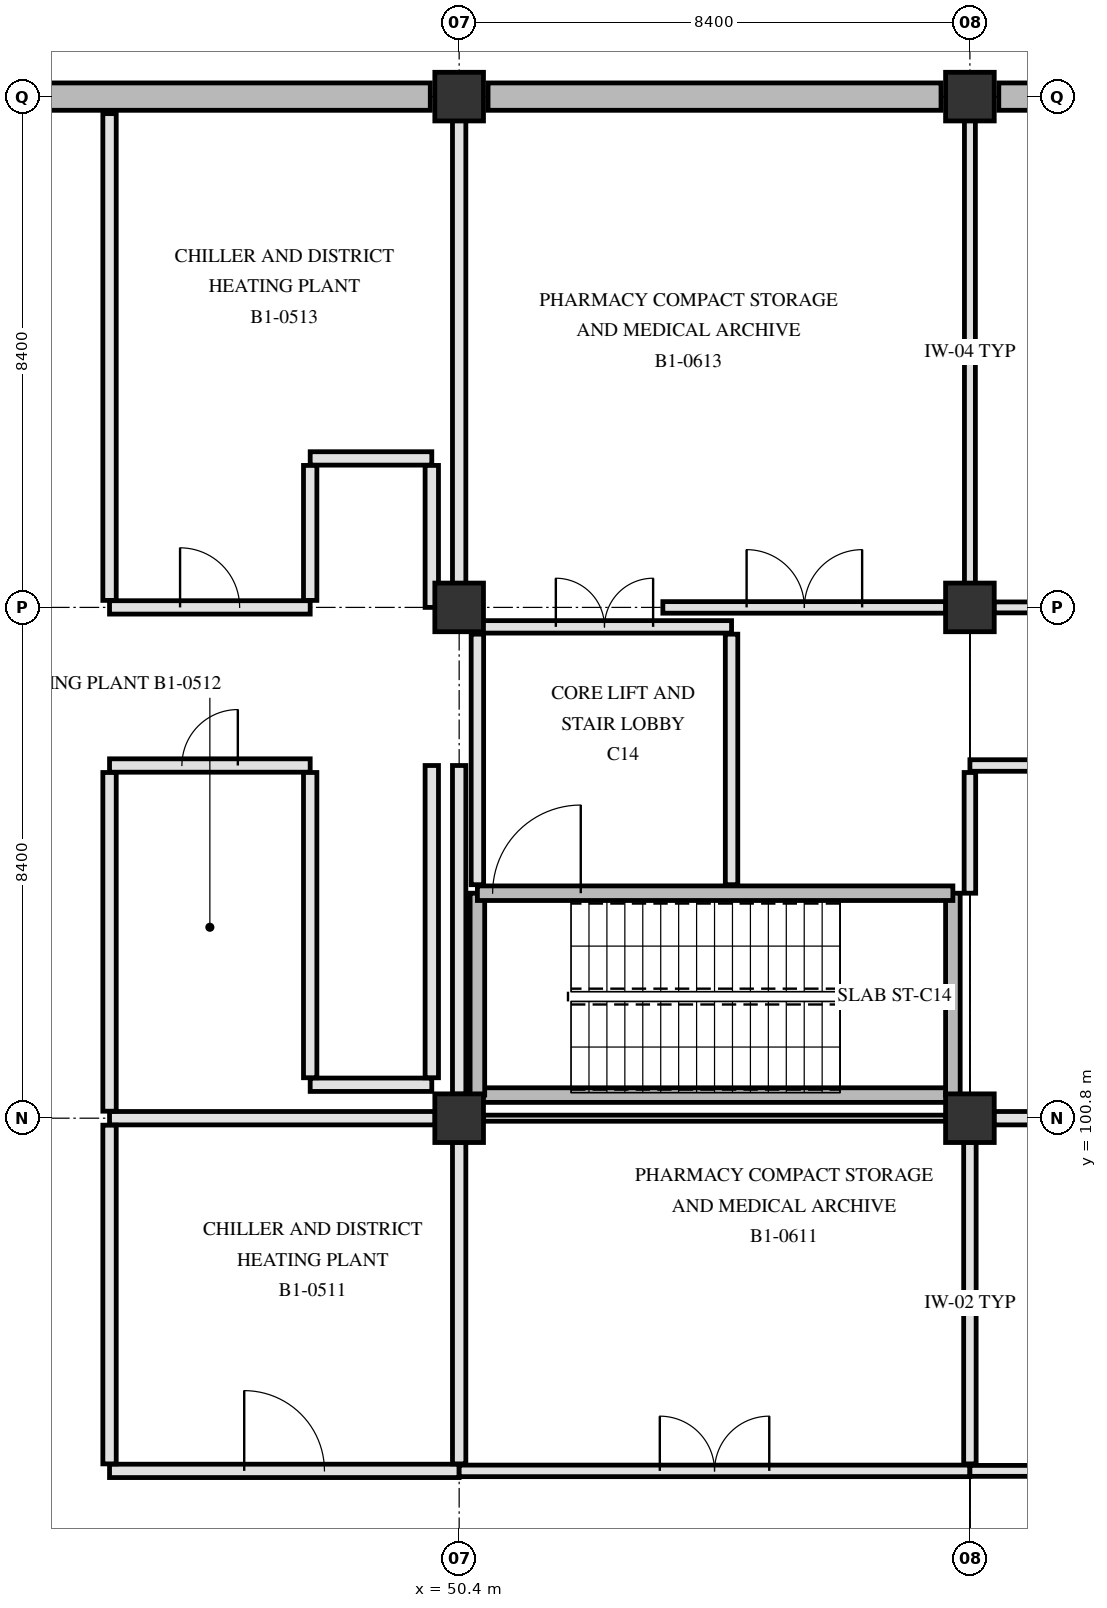
"""IFC4 building model, lengths in metres.
Left out: names, types, materials, properties, quantities, classifications, styles, units other than length and angle.
Written with IfcOpenShell. Run it as: python <this file> out.ifc"""

import sys

from ifc_helpers import new_model, si_unit, direction, frame, frame_2d, origin, origin_2d, place, context, subcontext, project, spatial, rectangle, extrude, element, fill, save


model = new_model("IFC4")
c1 = context("Model", 3, precision=1e-05, world=origin(), true_north=direction((0.0, 1.0)))
c2 = subcontext(c1, "Body", "Model", "MODEL_VIEW")
j1 = project(units=[si_unit("LENGTHUNIT", "METRE"), si_unit("PLANEANGLEUNIT", "RADIAN")], contexts=[c1])
p1 = place(None, origin())
s1 = spatial("IfcSite", under=j1, at=p1, CompositionType="ELEMENT")
p2 = place(p1, origin())
s2 = spatial("IfcBuilding", under=s1, at=p2, CompositionType="ELEMENT")
p3 = place(p2, frame((0.0, 0.0, -5.4)))
s3 = spatial("IfcBuildingStorey", under=s2, at=p3, CompositionType="ELEMENT", Elevation=-5.4)
for number, where, z_axis, x_axis in (
    (1, (50.4, 100.8, 0.0), (0.0, 0.0, 1.0), (1.0, 0.0, 0.0)),
    (2, (50.4, 109.2, 0.0), (0.0, 0.0, 1.0), (1.0, 0.0, 0.0)),
    (3, (50.4, 117.6, 0.0), (0.0, 0.0, 1.0), (1.0, 0.0, 0.0)),
    (4, (58.8, 100.8, 0.0), (0.0, 0.0, 1.0), (1.0, 0.0, 0.0)),
    (5, (58.8, 109.2, 0.0), (0.0, 0.0, 1.0), (1.0, 0.0, 0.0)),
    (6, (58.8, 117.6, 0.0), (0.0, 0.0, 1.0), (1.0, 0.0, 0.0)),
):
    element("IfcColumn", number, at=place(p3, frame(where, z_axis=z_axis, x_axis=x_axis)), inside=s3, PredefinedType="COLUMN", context=c2, shape_type="SweptSolid", body=[
        extrude(rectangle(XDim=0.8, YDim=0.8, at=origin_2d()), origin(), (0.0, 0.0, 1.0), 5.4),
    ])
for number, where, z_axis, x_axis in (
    (7, (42.475, 117.6, 0.0), (0.0, 0.0, 1.0), (1.0, 0.0, 0.0)),
    (8, (50.875, 117.6, 0.0), (0.0, 0.0, 1.0), (1.0, 0.0, 0.0)),
):
    element("IfcWall", number, at=place(p3, frame(where, z_axis=z_axis, x_axis=x_axis)), inside=s3, PredefinedType="SOLIDWALL", context=c2, shape_type="SweptSolid", body=[
        extrude(rectangle(XDim=7.45, YDim=0.45, at=frame_2d((3.725, 0.0))), origin(), (0.0, 0.0, 1.0), 5.08),
    ])
p4 = place(p3, frame((59.275, 117.6, 0.0), z_axis=(0.0, 0.0, 1.0), x_axis=(1.0, 0.0, 0.0)))
e9 = element("IfcWall", 9, at=p4, inside=s3, PredefinedType="SOLIDWALL", context=c2, shape_type="SweptSolid", body=[
    extrude(rectangle(XDim=7.4, YDim=0.45, at=frame_2d((3.7, 0.0))), origin(), (0.0, 0.0, 1.0), 5.08),
])
p5 = place(p3, frame((50.7, 101.18, 0.0), z_axis=(0.0, 0.0, 1.0), x_axis=(1.0, 0.0, 0.0)))
e10 = element("IfcWall", 10, at=p5, inside=s3, PredefinedType="SHEAR", context=c2, shape_type="SweptSolid", body=[
    extrude(rectangle(XDim=7.82, YDim=0.24, at=frame_2d((3.91, 0.0))), origin(), (0.0, 0.0, 1.0), 5.08),
])
for number, where, z_axis, x_axis in (
    (11, (50.7, 101.18, 0.0), (0.0, 0.0, 1.0), (0.0, 1.0, 0.0)),
    (12, (58.52, 101.18, 0.0), (0.0, 0.0, 1.0), (0.0, 1.0, 0.0)),
):
    element("IfcWall", number, at=place(p3, frame(where, z_axis=z_axis, x_axis=x_axis)), inside=s3, PredefinedType="SHEAR", context=c2, shape_type="SweptSolid", body=[
        extrude(rectangle(XDim=3.32, YDim=0.24, at=frame_2d((1.66, 0.0))), origin(), (0.0, 0.0, 1.0), 5.08),
    ])
p6 = place(p3, frame((50.7, 104.5, 0.0), z_axis=(0.0, 0.0, 1.0), x_axis=(1.0, 0.0, 0.0)))
e13 = element("IfcWall", 13, at=p6, inside=s3, PredefinedType="SHEAR", context=c2, shape_type="SweptSolid", body=[
    extrude(rectangle(XDim=7.82, YDim=0.24, at=frame_2d((3.91, 0.0))), origin(), (0.0, 0.0, 1.0), 5.08),
])
p7 = place(p6, frame((0.25, 0.0, 0.0)))
e14 = element("IfcOpeningElement", 14, at=p7, cuts=e13, PredefinedType="OPENING", context=c2, shape_type="SweptSolid", body=[
    extrude(rectangle(XDim=1.45, YDim=2.2, at=frame_2d((0.725, 1.1))), frame((0.0, 0.13, 0.0), z_axis=(0.0, -1.0, 0.0), x_axis=(1.0, 0.0, 0.0)), (0.0, 0.0, 1.0), 0.26),
])
p8 = place(p3, frame((54.88, 104.64, 0.0), z_axis=(0.0, 0.0, 1.0), x_axis=(0.0, 1.0, 0.0)))
e15 = element("IfcWall", 15, at=p8, inside=s3, PredefinedType="PARTITIONING", context=c2, shape_type="SweptSolid", body=[
    extrude(rectangle(XDim=4.12, YDim=0.205, at=frame_2d((2.06, 0.0))), origin(), (0.0, 0.0, 1.0), 5.07),
])
p9 = place(p3, frame((50.7, 104.64, 0.0), z_axis=(0.0, 0.0, 1.0), x_axis=(0.0, 1.0, 0.0)))
e16 = element("IfcWall", 16, at=p9, inside=s3, PredefinedType="PARTITIONING", context=c2, shape_type="SweptSolid", body=[
    extrude(rectangle(XDim=4.12, YDim=0.205, at=frame_2d((2.06, 0.0))), origin(), (0.0, 0.0, 1.0), 4.47),
])
p10 = place(p3, frame((50.7, 108.88, 0.0), z_axis=(0.0, 0.0, 1.0), x_axis=(1.0, 0.0, 0.0)))
e17 = element("IfcWall", 17, at=p10, inside=s3, PredefinedType="PARTITIONING", context=c2, shape_type="SweptSolid", body=[
    extrude(rectangle(XDim=4.18, YDim=0.205, at=frame_2d((2.09, 0.0))), origin(), (0.0, 0.0, 1.0), 4.42),
])
p11 = place(p10, frame((1.29, 0.0, 0.0)))
e18 = element("IfcOpeningElement", 18, at=p11, cuts=e17, PredefinedType="OPENING", context=c2, shape_type="SweptSolid", body=[
    extrude(rectangle(XDim=1.6, YDim=2.25, at=frame_2d((0.8, 1.125))), frame((0.0, 0.113, 0.0), z_axis=(0.0, -1.0, 0.0), x_axis=(1.0, 0.0, 0.0)), (0.0, 0.0, 1.0), 0.225),
])
p12 = place(p3, frame((44.65, 95.0, 0.0), z_axis=(0.0, 0.0, 1.0), x_axis=(1.0, 0.0, 0.0)))
e19 = element("IfcWall", 19, at=p12, inside=s3, PredefinedType="PARTITIONING", context=c2, shape_type="SweptSolid", body=[
    extrude(rectangle(XDim=5.75, YDim=0.22, at=frame_2d((2.875, 0.0))), origin(), (0.0, 0.0, 1.0), 4.47),
])
p13 = place(p12, frame((2.215, 0.0, 0.0)))
e20 = element("IfcOpeningElement", 20, at=p13, cuts=e19, PredefinedType="OPENING", context=c2, shape_type="SweptSolid", body=[
    extrude(rectangle(XDim=1.32, YDim=2.18, at=frame_2d((0.66, 1.09))), frame((0.0, 0.12, 0.0), z_axis=(0.0, -1.0, 0.0), x_axis=(1.0, 0.0, 0.0)), (0.0, 0.0, 1.0), 0.24),
])
p14 = place(p3, frame((50.4, 95.0, 0.0), z_axis=(0.0, 0.0, 1.0), x_axis=(1.0, 0.0, 0.0)))
e21 = element("IfcWall", 21, at=p14, inside=s3, PredefinedType="PARTITIONING", context=c2, shape_type="SweptSolid", body=[
    extrude(rectangle(XDim=8.4, YDim=0.19, at=frame_2d((4.2, 0.0))), origin(), (0.0, 0.0, 1.0), 4.47),
])
p15 = place(p14, frame((3.3, 0.0, 0.0)))
e22 = element("IfcOpeningElement", 22, at=p15, cuts=e21, PredefinedType="OPENING", context=c2, shape_type="SweptSolid", body=[
    extrude(rectangle(XDim=1.8, YDim=2.25, at=frame_2d((0.9, 1.125))), frame((0.0, 0.105, 0.0), z_axis=(0.0, -1.0, 0.0), x_axis=(1.0, 0.0, 0.0)), (0.0, 0.0, 1.0), 0.21),
])
p16 = place(p3, frame((58.8, 95.0, 0.0), z_axis=(0.0, 0.0, 1.0), x_axis=(1.0, 0.0, 0.0)))
e23 = element("IfcWall", 23, at=p16, inside=s3, PredefinedType="PARTITIONING", context=c2, shape_type="SweptSolid", body=[
    extrude(rectangle(XDim=8.4, YDim=0.18, at=frame_2d((4.2, 0.0))), origin(), (0.0, 0.0, 1.0), 4.47),
])
p17 = place(p16, frame((3.46, 0.0, 0.0)))
e24 = element("IfcOpeningElement", 24, at=p17, cuts=e23, PredefinedType="OPENING", context=c2, shape_type="SweptSolid", body=[
    extrude(rectangle(XDim=1.48, YDim=2.22, at=frame_2d((0.74, 1.11))), frame((0.0, 0.1, 0.0), z_axis=(0.0, -1.0, 0.0), x_axis=(1.0, 0.0, 0.0)), (0.0, 0.0, 1.0), 0.2),
])
p18 = place(p3, frame((44.65, 100.8, 0.0), z_axis=(0.0, 0.0, 1.0), x_axis=(1.0, 0.0, 0.0)))
e25 = element("IfcWall", 25, at=p18, inside=s3, PredefinedType="PARTITIONING", context=c2, shape_type="SweptSolid", body=[
    extrude(rectangle(XDim=5.355, YDim=0.22, at=frame_2d((2.677, 0.0))), origin(), (0.0, 0.0, 1.0), 4.42),
])
p19 = place(p3, frame((50.795, 100.8, 0.0), z_axis=(0.0, 0.0, 1.0), x_axis=(1.0, 0.0, 0.0)))
e26 = element("IfcWall", 26, at=p19, inside=s3, PredefinedType="PARTITIONING", context=c2, shape_type="SweptSolid", body=[
    extrude(rectangle(XDim=7.61, YDim=0.1, at=frame_2d((3.805, 0.0))), origin(), (0.0, 0.0, 1.0), 4.42),
])
p20 = place(p3, frame((59.195, 100.8, 0.0), z_axis=(0.0, 0.0, 1.0), x_axis=(1.0, 0.0, 0.0)))
e27 = element("IfcWall", 27, at=p20, inside=s3, PredefinedType="PARTITIONING", context=c2, shape_type="SweptSolid", body=[
    extrude(rectangle(XDim=7.56, YDim=0.22, at=frame_2d((3.78, 0.0))), origin(), (0.0, 0.0, 1.0), 4.42),
])
p21 = place(p3, frame((47.95, 101.35, 0.0), z_axis=(0.0, 0.0, 1.0), x_axis=(1.0, 0.0, 0.0)))
e28 = element("IfcWall", 28, at=p21, inside=s3, PredefinedType="PARTITIONING", context=c2, shape_type="SweptSolid", body=[
    extrude(rectangle(XDim=2.0, YDim=0.22, at=frame_2d((1.0, 0.0))), origin(), (0.0, 0.0, 1.0), 5.07),
])
p22 = place(p3, frame((44.65, 106.6, 0.0), z_axis=(0.0, 0.0, 1.0), x_axis=(1.0, 0.0, 0.0)))
e29 = element("IfcWall", 29, at=p22, inside=s3, PredefinedType="PARTITIONING", context=c2, shape_type="SweptSolid", body=[
    extrude(rectangle(XDim=3.3, YDim=0.22, at=frame_2d((1.65, 0.0))), origin(), (0.0, 0.0, 1.0), 5.07),
])
p23 = place(p22, frame((1.19, 0.0, 0.0)))
e30 = element("IfcOpeningElement", 30, at=p23, cuts=e29, PredefinedType="OPENING", context=c2, shape_type="SweptSolid", body=[
    extrude(rectangle(XDim=0.92, YDim=2.08, at=frame_2d((0.46, 1.04))), frame((0.0, 0.12, 0.0), z_axis=(0.0, -1.0, 0.0), x_axis=(1.0, 0.0, 0.0)), (0.0, 0.0, 1.0), 0.24),
])
p24 = place(p3, frame((58.8, 106.6, 0.0), z_axis=(0.0, 0.0, 1.0), x_axis=(1.0, 0.0, 0.0)))
e31 = element("IfcWall", 31, at=p24, inside=s3, PredefinedType="PARTITIONING", context=c2, shape_type="SweptSolid", body=[
    extrude(rectangle(XDim=8.4, YDim=0.19, at=frame_2d((4.2, 0.0))), origin(), (0.0, 0.0, 1.0), 4.47),
])
p25 = place(p24, frame((3.43, 0.0, 0.0)))
e32 = element("IfcOpeningElement", 32, at=p25, cuts=e31, PredefinedType="OPENING", context=c2, shape_type="SweptSolid", body=[
    extrude(rectangle(XDim=1.54, YDim=2.24, at=frame_2d((0.77, 1.12))), frame((0.0, 0.105, 0.0), z_axis=(0.0, -1.0, 0.0), x_axis=(1.0, 0.0, 0.0)), (0.0, 0.0, 1.0), 0.21),
])
p26 = place(p3, frame((44.65, 109.2, 0.0), z_axis=(0.0, 0.0, 1.0), x_axis=(1.0, 0.0, 0.0)))
e33 = element("IfcWall", 33, at=p26, inside=s3, PredefinedType="PARTITIONING", context=c2, shape_type="SweptSolid", body=[
    extrude(rectangle(XDim=3.3, YDim=0.22, at=frame_2d((1.65, 0.0))), origin(), (0.0, 0.0, 1.0), 4.42),
])
p27 = place(p26, frame((1.16, 0.0, 0.0)))
e34 = element("IfcOpeningElement", 34, at=p27, cuts=e33, PredefinedType="OPENING", context=c2, shape_type="SweptSolid", body=[
    extrude(rectangle(XDim=0.98, YDim=2.12, at=frame_2d((0.49, 1.06))), frame((0.0, 0.12, 0.0), z_axis=(0.0, -1.0, 0.0), x_axis=(1.0, 0.0, 0.0)), (0.0, 0.0, 1.0), 0.24),
])
p28 = place(p3, frame((53.75, 109.2, 0.0), z_axis=(0.0, 0.0, 1.0), x_axis=(1.0, 0.0, 0.0)))
e35 = element("IfcWall", 35, at=p28, inside=s3, PredefinedType="PARTITIONING", context=c2, shape_type="SweptSolid", body=[
    extrude(rectangle(XDim=4.655, YDim=0.19, at=frame_2d((2.328, 0.0))), origin(), (0.0, 0.0, 1.0), 4.42),
])
p29 = place(p28, frame((1.377, 0.0, 0.0)))
e36 = element("IfcOpeningElement", 36, at=p29, cuts=e35, PredefinedType="OPENING", context=c2, shape_type="SweptSolid", body=[
    extrude(rectangle(XDim=1.9, YDim=2.3, at=frame_2d((0.95, 1.15))), frame((0.0, 0.105, 0.0), z_axis=(0.0, -1.0, 0.0), x_axis=(1.0, 0.0, 0.0)), (0.0, 0.0, 1.0), 0.21),
])
p30 = place(p3, frame((59.195, 109.2, 0.0), z_axis=(0.0, 0.0, 1.0), x_axis=(1.0, 0.0, 0.0)))
e37 = element("IfcWall", 37, at=p30, inside=s3, PredefinedType="PARTITIONING", context=c2, shape_type="SweptSolid", body=[
    extrude(rectangle(XDim=7.56, YDim=0.18, at=frame_2d((3.78, 0.0))), origin(), (0.0, 0.0, 1.0), 4.42),
])
p31 = place(p30, frame((2.96, 0.0, 0.0)))
e38 = element("IfcOpeningElement", 38, at=p31, cuts=e37, PredefinedType="OPENING", context=c2, shape_type="SweptSolid", body=[
    extrude(rectangle(XDim=1.64, YDim=2.28, at=frame_2d((0.82, 1.14))), frame((0.0, 0.1, 0.0), z_axis=(0.0, -1.0, 0.0), x_axis=(1.0, 0.0, 0.0)), (0.0, 0.0, 1.0), 0.2),
])
p32 = place(p3, frame((47.95, 111.65, 0.0), z_axis=(0.0, 0.0, 1.0), x_axis=(1.0, 0.0, 0.0)))
e39 = element("IfcWall", 39, at=p32, inside=s3, PredefinedType="PARTITIONING", context=c2, shape_type="SweptSolid", body=[
    extrude(rectangle(XDim=2.0, YDim=0.22, at=frame_2d((1.0, 0.0))), origin(), (0.0, 0.0, 1.0), 5.07),
])
for number, where, z_axis, x_axis in (
    (40, (44.65, 95.115, 0.0), (0.0, 0.0, 1.0), (0.0, 1.0, 0.0)),
    (41, (44.65, 100.915, 0.0), (0.0, 0.0, 1.0), (0.0, 1.0, 0.0)),
):
    element("IfcWall", number, at=place(p3, frame(where, z_axis=z_axis, x_axis=x_axis)), inside=s3, PredefinedType="PARTITIONING", context=c2, shape_type="SweptSolid", body=[
        extrude(rectangle(XDim=5.57, YDim=0.22, at=frame_2d((2.785, 0.0))), origin(), (0.0, 0.0, 1.0), 4.42),
    ])
p33 = place(p3, frame((44.65, 109.315, 0.0), z_axis=(0.0, 0.0, 1.0), x_axis=(0.0, 1.0, 0.0)))
e42 = element("IfcWall", 42, at=p33, inside=s3, PredefinedType="PARTITIONING", context=c2, shape_type="SweptSolid", body=[
    extrude(rectangle(XDim=8.005, YDim=0.22, at=frame_2d((4.002, 0.0))), origin(), (0.0, 0.0, 1.0), 4.42),
])
p34 = place(p3, frame((47.95, 101.465, 0.0), z_axis=(0.0, 0.0, 1.0), x_axis=(0.0, 1.0, 0.0)))
e43 = element("IfcWall", 43, at=p34, inside=s3, PredefinedType="PARTITIONING", context=c2, shape_type="SweptSolid", body=[
    extrude(rectangle(XDim=5.02, YDim=0.22, at=frame_2d((2.51, 0.0))), origin(), (0.0, 0.0, 1.0), 5.07),
])
p35 = place(p3, frame((47.95, 109.315, 0.0), z_axis=(0.0, 0.0, 1.0), x_axis=(0.0, 1.0, 0.0)))
e44 = element("IfcWall", 44, at=p35, inside=s3, PredefinedType="PARTITIONING", context=c2, shape_type="SweptSolid", body=[
    extrude(rectangle(XDim=2.22, YDim=0.22, at=frame_2d((1.11, 0.0))), origin(), (0.0, 0.0, 1.0), 4.42),
])
p36 = place(p3, frame((49.95, 101.465, 0.0), z_axis=(0.0, 0.0, 1.0), x_axis=(0.0, 1.0, 0.0)))
e45 = element("IfcWall", 45, at=p36, inside=s3, PredefinedType="PARTITIONING", context=c2, shape_type="SweptSolid", body=[
    extrude(rectangle(XDim=5.135, YDim=0.22, at=frame_2d((2.567, 0.0))), origin(), (0.0, 0.0, 1.0), 5.07),
])
p37 = place(p3, frame((49.95, 109.2, 0.0), z_axis=(0.0, 0.0, 1.0), x_axis=(0.0, 1.0, 0.0)))
e46 = element("IfcWall", 46, at=p37, inside=s3, PredefinedType="PARTITIONING", context=c2, shape_type="SweptSolid", body=[
    extrude(rectangle(XDim=2.335, YDim=0.22, at=frame_2d((1.167, 0.0))), origin(), (0.0, 0.0, 1.0), 4.42),
])
p38 = place(p3, frame((50.4, 95.115, 0.0), z_axis=(0.0, 0.0, 1.0), x_axis=(0.0, 1.0, 0.0)))
e47 = element("IfcWall", 47, at=p38, inside=s3, PredefinedType="PARTITIONING", context=c2, shape_type="SweptSolid", body=[
    extrude(rectangle(XDim=5.29, YDim=0.22, at=frame_2d((2.645, 0.0))), origin(), (0.0, 0.0, 1.0), 4.47),
])
p39 = place(p3, frame((50.4, 101.195, 0.0), z_axis=(0.0, 0.0, 1.0), x_axis=(0.0, 1.0, 0.0)))
e48 = element("IfcWall", 48, at=p39, inside=s3, PredefinedType="PARTITIONING", context=c2, shape_type="SweptSolid", body=[
    extrude(rectangle(XDim=5.405, YDim=0.22, at=frame_2d((2.703, 0.0))), origin(), (0.0, 0.0, 1.0), 4.47),
])
p40 = place(p3, frame((50.4, 109.595, 0.0), z_axis=(0.0, 0.0, 1.0), x_axis=(0.0, 1.0, 0.0)))
e49 = element("IfcWall", 49, at=p40, inside=s3, PredefinedType="PARTITIONING", context=c2, shape_type="SweptSolid", body=[
    extrude(rectangle(XDim=7.61, YDim=0.22, at=frame_2d((3.805, 0.0))), origin(), (0.0, 0.0, 1.0), 4.47),
])
p41 = place(p3, frame((58.8, 95.115, 0.0), z_axis=(0.0, 0.0, 1.0), x_axis=(0.0, 1.0, 0.0)))
e50 = element("IfcWall", 50, at=p41, inside=s3, PredefinedType="PARTITIONING", context=c2, shape_type="SweptSolid", body=[
    extrude(rectangle(XDim=5.29, YDim=0.205, at=frame_2d((2.645, 0.0))), origin(), (0.0, 0.0, 1.0), 4.47),
])
p42 = place(p3, frame((58.8, 104.5, 0.0), z_axis=(0.0, 0.0, 1.0), x_axis=(0.0, 1.0, 0.0)))
e51 = element("IfcWall", 51, at=p42, inside=s3, PredefinedType="PARTITIONING", context=c2, shape_type="SweptSolid", body=[
    extrude(rectangle(XDim=1.985, YDim=0.19, at=frame_2d((0.993, 0.0))), origin(), (0.0, 0.0, 1.0), 4.47),
])
p43 = place(p3, frame((58.8, 109.595, 0.0), z_axis=(0.0, 0.0, 1.0), x_axis=(0.0, 1.0, 0.0)))
e52 = element("IfcWall", 52, at=p43, inside=s3, PredefinedType="PARTITIONING", context=c2, shape_type="SweptSolid", body=[
    extrude(rectangle(XDim=7.61, YDim=0.18, at=frame_2d((3.805, 0.0))), origin(), (0.0, 0.0, 1.0), 4.47),
])
p44 = place(p7, origin())
e53 = element("IfcDoor", 53, at=p44, inside=s3, OperationType="SINGLE_SWING_RIGHT", PredefinedType="DOOR", context=c2, shape_type="SweptSolid", body=[
    extrude(rectangle(XDim=1.45, YDim=2.2, at=frame_2d((0.725, 1.1))), frame((0.0, 0.025, 0.0), z_axis=(0.0, -1.0, 0.0), x_axis=(1.0, 0.0, 0.0)), (0.0, 0.0, 1.0), 0.05),
])
fill(e14, e53)
p45 = place(p11, origin())
e54 = element("IfcDoor", 54, at=p45, inside=s3, OperationType="DOUBLE_SWING_LEFT", PredefinedType="DOOR", context=c2, shape_type="SweptSolid", body=[
    extrude(rectangle(XDim=1.6, YDim=2.25, at=frame_2d((0.8, 1.125))), frame((0.0, 0.025, 0.0), z_axis=(0.0, -1.0, 0.0), x_axis=(1.0, 0.0, 0.0)), (0.0, 0.0, 1.0), 0.05),
])
fill(e18, e54)
p46 = place(p13, origin())
e55 = element("IfcDoor", 55, at=p46, inside=s3, OperationType="SINGLE_SWING_LEFT", PredefinedType="DOOR", context=c2, shape_type="SweptSolid", body=[
    extrude(rectangle(XDim=1.32, YDim=2.18, at=frame_2d((0.66, 1.09))), frame((0.0, 0.025, 0.0), z_axis=(0.0, -1.0, 0.0), x_axis=(1.0, 0.0, 0.0)), (0.0, 0.0, 1.0), 0.05),
])
fill(e20, e55)
p47 = place(p23, origin())
e56 = element("IfcDoor", 56, at=p47, inside=s3, OperationType="SINGLE_SWING_RIGHT", PredefinedType="DOOR", context=c2, shape_type="SweptSolid", body=[
    extrude(rectangle(XDim=0.92, YDim=2.08, at=frame_2d((0.46, 1.04))), frame((0.0, 0.025, 0.0), z_axis=(0.0, -1.0, 0.0), x_axis=(1.0, 0.0, 0.0)), (0.0, 0.0, 1.0), 0.05),
])
fill(e30, e56)
p48 = place(p27, origin())
e57 = element("IfcDoor", 57, at=p48, inside=s3, OperationType="SINGLE_SWING_LEFT", PredefinedType="DOOR", context=c2, shape_type="SweptSolid", body=[
    extrude(rectangle(XDim=0.98, YDim=2.12, at=frame_2d((0.49, 1.06))), frame((0.0, 0.025, 0.0), z_axis=(0.0, -1.0, 0.0), x_axis=(1.0, 0.0, 0.0)), (0.0, 0.0, 1.0), 0.05),
])
fill(e34, e57)
p49 = place(p15, origin())
e58 = element("IfcDoor", 58, at=p49, inside=s3, OperationType="DOUBLE_SWING_RIGHT", PredefinedType="DOOR", context=c2, shape_type="SweptSolid", body=[
    extrude(rectangle(XDim=1.8, YDim=2.25, at=frame_2d((0.9, 1.125))), frame((0.0, 0.025, 0.0), z_axis=(0.0, -1.0, 0.0), x_axis=(1.0, 0.0, 0.0)), (0.0, 0.0, 1.0), 0.05),
])
fill(e22, e58)
p50 = place(p29, origin())
e59 = element("IfcDoor", 59, at=p50, inside=s3, OperationType="DOUBLE_SWING_LEFT", PredefinedType="DOOR", context=c2, shape_type="SweptSolid", body=[
    extrude(rectangle(XDim=1.9, YDim=2.3, at=frame_2d((0.95, 1.15))), frame((0.0, 0.025, 0.0), z_axis=(0.0, -1.0, 0.0), x_axis=(1.0, 0.0, 0.0)), (0.0, 0.0, 1.0), 0.05),
])
fill(e36, e59)
save(model, sys.argv[1])
